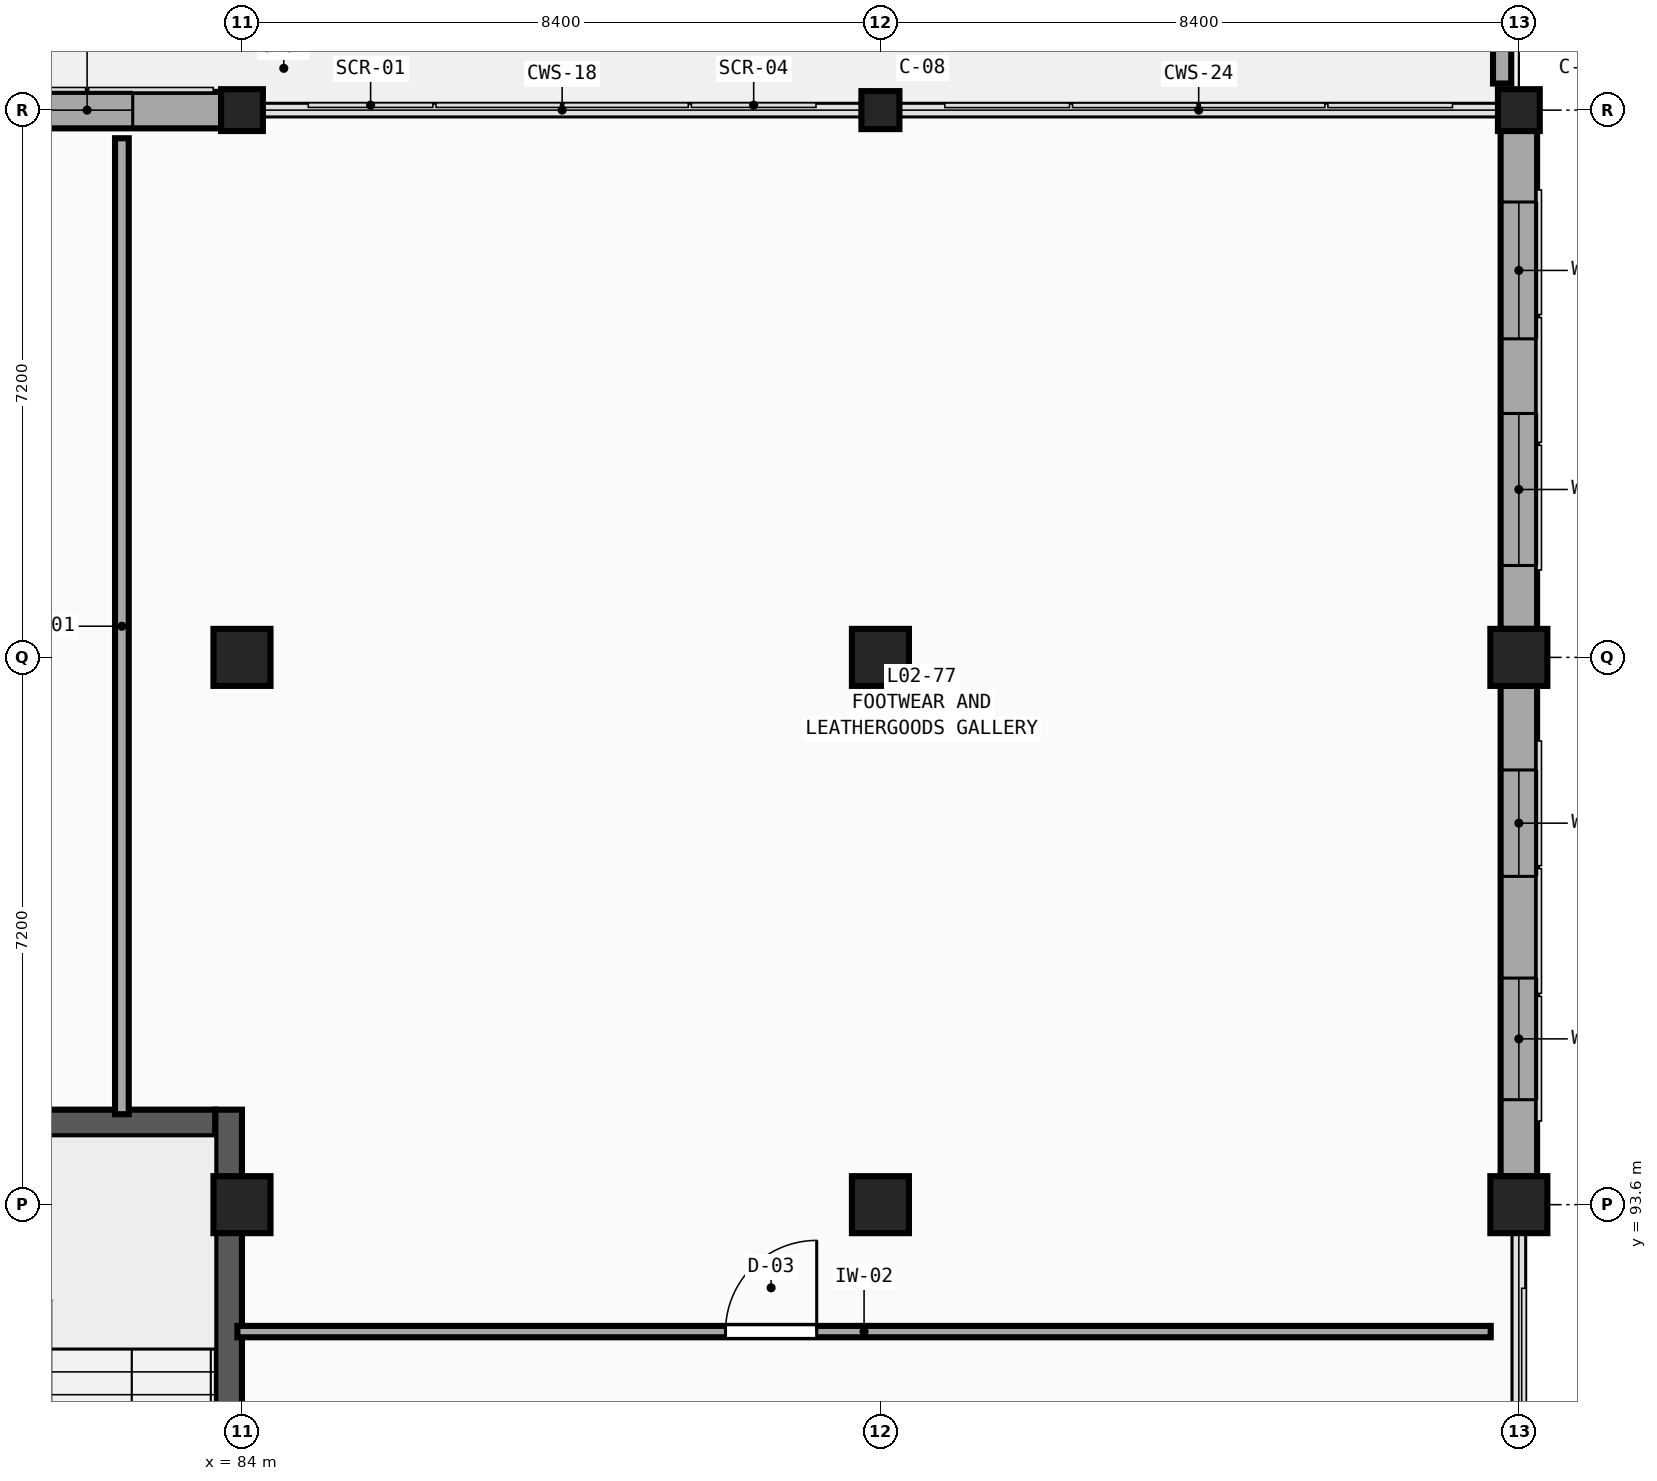
"""IFC4 building model, lengths in metres.
Left out: names, types, materials, properties, quantities, classifications, styles, units other than length and angle.
Written with IfcOpenShell. Run it as: python <this file> out.ifc"""

import sys

from ifc_helpers import new_model, si_unit, direction, frame, frame_2d, origin, origin_2d, place, context, subcontext, project, spatial, rectangle, extrude, element, fill, save


model = new_model("IFC4")
c1 = context("Model", 3, precision=1e-05, world=origin(), true_north=direction((0.0, 1.0)))
c2 = subcontext(c1, "Body", "Model", "MODEL_VIEW")
j1 = project(units=[si_unit("LENGTHUNIT", "METRE"), si_unit("PLANEANGLEUNIT", "RADIAN")], contexts=[c1])
p1 = place(None, origin())
s1 = spatial("IfcSite", under=j1, at=p1, CompositionType="ELEMENT")
p2 = place(p1, origin())
s2 = spatial("IfcBuilding", under=s1, at=p2, CompositionType="ELEMENT")
p3 = place(p2, frame((0.0, 0.0, 9.9)))
s3 = spatial("IfcBuildingStorey", under=s2, at=p3, CompositionType="ELEMENT", Elevation=9.9)
for number, where, z_axis, x_axis in (
    (1, (84.0, 93.6, 0.0), (0.0, 0.0, 1.0), (1.0, 0.0, 0.0)),
    (2, (84.0, 100.8, 0.0), (0.0, 0.0, 1.0), (1.0, 0.0, 0.0)),
):
    element("IfcColumn", number, at=place(p3, frame(where, z_axis=z_axis, x_axis=x_axis)), inside=s3, PredefinedType="COLUMN", context=c2, shape_type="SweptSolid", body=[
        extrude(rectangle(XDim=0.75, YDim=0.75, at=origin_2d()), origin(), (0.0, 0.0, 1.0), 4.5),
    ])
p4 = place(p3, frame((84.0, 108.0, 0.0), z_axis=(0.0, 0.0, 1.0), x_axis=(1.0, 0.0, 0.0)))
e3 = element("IfcColumn", 3, at=p4, inside=s3, PredefinedType="COLUMN", context=c2, shape_type="SweptSolid", body=[
    extrude(rectangle(XDim=0.55, YDim=0.55, at=origin_2d()), origin(), (0.0, 0.0, 1.0), 4.5),
])
for number, where, z_axis, x_axis in (
    (4, (92.4, 93.6, 0.0), (0.0, 0.0, 1.0), (1.0, 0.0, 0.0)),
    (5, (92.4, 100.8, 0.0), (0.0, 0.0, 1.0), (1.0, 0.0, 0.0)),
):
    element("IfcColumn", number, at=place(p3, frame(where, z_axis=z_axis, x_axis=x_axis)), inside=s3, PredefinedType="COLUMN", context=c2, shape_type="SweptSolid", body=[
        extrude(rectangle(XDim=0.75, YDim=0.75, at=origin_2d()), origin(), (0.0, 0.0, 1.0), 4.5),
    ])
p5 = place(p3, frame((92.4, 108.0, 0.0), z_axis=(0.0, 0.0, 1.0), x_axis=(1.0, 0.0, 0.0)))
e6 = element("IfcColumn", 6, at=p5, inside=s3, PredefinedType="COLUMN", context=c2, shape_type="SweptSolid", body=[
    extrude(rectangle(XDim=0.5, YDim=0.5, at=origin_2d()), origin(), (0.0, 0.0, 1.0), 4.5),
])
for number, where, z_axis, x_axis in (
    (7, (100.8, 93.6, 0.0), (0.0, 0.0, 1.0), (1.0, 0.0, 0.0)),
    (8, (100.8, 100.8, 0.0), (0.0, 0.0, 1.0), (1.0, 0.0, 0.0)),
):
    element("IfcColumn", number, at=place(p3, frame(where, z_axis=z_axis, x_axis=x_axis)), inside=s3, PredefinedType="COLUMN", context=c2, shape_type="SweptSolid", body=[
        extrude(rectangle(XDim=0.75, YDim=0.75, at=origin_2d()), origin(), (0.0, 0.0, 1.0), 4.5),
    ])
p6 = place(p3, frame((100.8, 108.0, 0.0), z_axis=(0.0, 0.0, 1.0), x_axis=(1.0, 0.0, 0.0)))
e9 = element("IfcColumn", 9, at=p6, inside=s3, PredefinedType="COLUMN", context=c2, shape_type="SweptSolid", body=[
    extrude(rectangle(XDim=0.55, YDim=0.55, at=origin_2d()), origin(), (0.0, 0.0, 1.0), 4.5),
])
p7 = place(p3, frame((80.2, 108.0, 0.0), z_axis=(0.0, 0.0, 1.0), x_axis=(1.0, 0.0, 0.0)))
e10 = element("IfcWall", 10, at=p7, inside=s3, PredefinedType="SOLIDWALL", context=c2, shape_type="SweptSolid", body=[
    extrude(rectangle(XDim=3.525, YDim=0.48, at=frame_2d((1.763, 0.0))), origin(), (0.0, 0.0, 1.0), 3.63),
])
p8 = place(p7, frame((1.163, 0.0, 0.75)))
e11 = element("IfcOpeningElement", 11, at=p8, cuts=e10, PredefinedType="OPENING", context=c2, shape_type="SweptSolid", body=[
    extrude(rectangle(XDim=1.2, YDim=2.44, at=frame_2d((0.6, 1.22))), frame((0.0, 0.26, 0.0), z_axis=(0.0, -1.0, 0.0), x_axis=(1.0, 0.0, 0.0)), (0.0, 0.0, 1.0), 0.52),
])
p9 = place(p3, frame((100.8, 100.425, 0.0), z_axis=(0.0, 0.0, 1.0), x_axis=(0.0, -1.0, 0.0)))
e12 = element("IfcWall", 12, at=p9, inside=s3, PredefinedType="SOLIDWALL", context=c2, shape_type="SweptSolid", body=[
    extrude(rectangle(XDim=6.45, YDim=0.48, at=frame_2d((3.225, 0.0))), origin(), (0.0, 0.0, 1.0), 3.63),
])
p10 = place(p9, frame((1.106, 0.0, 0.75)))
e13 = element("IfcOpeningElement", 13, at=p10, cuts=e12, PredefinedType="OPENING", context=c2, shape_type="SweptSolid", body=[
    extrude(rectangle(XDim=1.4, YDim=2.73, at=frame_2d((0.7, 1.365))), frame((0.0, 0.26, 0.0), z_axis=(0.0, -1.0, 0.0), x_axis=(1.0, 0.0, 0.0)), (0.0, 0.0, 1.0), 0.52),
])
p11 = place(p9, frame((3.844, 0.0, 0.75)))
e14 = element("IfcOpeningElement", 14, at=p11, cuts=e12, PredefinedType="OPENING", context=c2, shape_type="SweptSolid", body=[
    extrude(rectangle(XDim=1.6, YDim=2.73, at=frame_2d((0.8, 1.365))), frame((0.0, 0.26, 0.0), z_axis=(0.0, -1.0, 0.0), x_axis=(1.0, 0.0, 0.0)), (0.0, 0.0, 1.0), 0.52),
])
p12 = place(p3, frame((100.8, 107.725, 0.0), z_axis=(0.0, 0.0, 1.0), x_axis=(0.0, -1.0, 0.0)))
e15 = element("IfcWall", 15, at=p12, inside=s3, PredefinedType="SOLIDWALL", context=c2, shape_type="SweptSolid", body=[
    extrude(rectangle(XDim=6.55, YDim=0.48, at=frame_2d((3.275, 0.0))), origin(), (0.0, 0.0, 1.0), 3.63),
])
p13 = place(p12, frame((0.934, 0.0, 0.75)))
e16 = element("IfcOpeningElement", 16, at=p13, cuts=e15, PredefinedType="OPENING", context=c2, shape_type="SweptSolid", body=[
    extrude(rectangle(XDim=1.8, YDim=2.73, at=frame_2d((0.9, 1.365))), frame((0.0, 0.26, 0.0), z_axis=(0.0, -1.0, 0.0), x_axis=(1.0, 0.0, 0.0)), (0.0, 0.0, 1.0), 0.52),
])
p14 = place(p12, frame((3.716, 0.0, 0.75)))
e17 = element("IfcOpeningElement", 17, at=p14, cuts=e15, PredefinedType="OPENING", context=c2, shape_type="SweptSolid", body=[
    extrude(rectangle(XDim=2.0, YDim=2.73, at=frame_2d((1.0, 1.365))), frame((0.0, 0.26, 0.0), z_axis=(0.0, -1.0, 0.0), x_axis=(1.0, 0.0, 0.0)), (0.0, 0.0, 1.0), 0.52),
])
p15 = place(p3, frame((100.58, 114.85, 0.0), z_axis=(0.0, 0.0, 1.0), x_axis=(0.0, -1.0, 0.0)))
e18 = element("IfcWall", 18, at=p15, inside=s3, PredefinedType="PARAPET", context=c2, shape_type="SweptSolid", body=[
    extrude(rectangle(XDim=6.5, YDim=0.24, at=frame_2d((3.25, 0.0))), origin(), (0.0, 0.0, 1.0), 1.15),
])
p16 = place(p3, frame((75.95, 94.675, 0.0), z_axis=(0.0, 0.0, 1.0), x_axis=(1.0, 0.0, 0.0)))
e19 = element("IfcWall", 19, at=p16, inside=s3, PredefinedType="SHEAR", context=c2, shape_type="SweptSolid", body=[
    extrude(rectangle(XDim=7.7, YDim=0.35, at=frame_2d((3.85, 0.0))), origin(), (0.0, 0.0, 1.0), 4.5),
])
p17 = place(p3, frame((83.825, 86.5, 0.0), z_axis=(0.0, 0.0, 1.0), x_axis=(0.0, 1.0, 0.0)))
e20 = element("IfcWall", 20, at=p17, inside=s3, PredefinedType="SHEAR", context=c2, shape_type="SweptSolid", body=[
    extrude(rectangle(XDim=8.35, YDim=0.35, at=frame_2d((4.175, 0.0))), origin(), (0.0, 0.0, 1.0), 4.5),
])
p18 = place(p3, frame((83.94, 91.93, 0.0), z_axis=(0.0, 0.0, 1.0), x_axis=(1.0, 0.0, 0.0)))
e21 = element("IfcWall", 21, at=p18, inside=s3, PredefinedType="PARTITIONING", context=c2, shape_type="SweptSolid", body=[
    extrude(rectangle(XDim=16.49, YDim=0.15, at=frame_2d((8.245, 0.0))), origin(), (0.0, 0.0, 1.0), 4.18),
])
p19 = place(p18, frame((6.422, 0.0, 0.0)))
e22 = element("IfcOpeningElement", 22, at=p19, cuts=e21, PredefinedType="OPENING", context=c2, shape_type="SweptSolid", body=[
    extrude(rectangle(XDim=1.2, YDim=2.05, at=frame_2d((0.6, 1.025))), frame((0.0, 0.095, 0.0), z_axis=(0.0, -1.0, 0.0), x_axis=(1.0, 0.0, 0.0)), (0.0, 0.0, 1.0), 0.19),
])
p20 = place(p3, frame((82.42, 94.79, 0.0), z_axis=(0.0, 0.0, 1.0), x_axis=(0.0, 1.0, 0.0)))
e23 = element("IfcWall", 23, at=p20, inside=s3, PredefinedType="PARTITIONING", context=c2, shape_type="SweptSolid", body=[
    extrude(rectangle(XDim=12.84, YDim=0.18, at=frame_2d((6.42, 0.0))), origin(), (0.0, 0.0, 1.0), 4.18),
])
p21 = place(p8, origin())
e24 = element("IfcWindow", 24, at=p21, inside=s3, PartitioningType="SINGLE_PANEL", PredefinedType="WINDOW", context=c2, shape_type="SweptSolid", body=[
    extrude(rectangle(XDim=1.2, YDim=2.44, at=frame_2d((0.6, 1.22))), frame((0.0, 0.03, 0.0), z_axis=(0.0, -1.0, 0.0), x_axis=(1.0, 0.0, 0.0)), (0.0, 0.0, 1.0), 0.06),
])
fill(e11, e24)
p22 = place(p10, origin())
e25 = element("IfcWindow", 25, at=p22, inside=s3, PartitioningType="DOUBLE_PANEL_VERTICAL", PredefinedType="WINDOW", context=c2, shape_type="SweptSolid", body=[
    extrude(rectangle(XDim=1.4, YDim=2.73, at=frame_2d((0.7, 1.365))), frame((0.0, 0.03, 0.0), z_axis=(0.0, -1.0, 0.0), x_axis=(1.0, 0.0, 0.0)), (0.0, 0.0, 1.0), 0.06),
])
fill(e13, e25)
p23 = place(p11, origin())
e26 = element("IfcWindow", 26, at=p23, inside=s3, PartitioningType="DOUBLE_PANEL_VERTICAL", PredefinedType="WINDOW", context=c2, shape_type="SweptSolid", body=[
    extrude(rectangle(XDim=1.6, YDim=2.73, at=frame_2d((0.8, 1.365))), frame((0.0, 0.03, 0.0), z_axis=(0.0, -1.0, 0.0), x_axis=(1.0, 0.0, 0.0)), (0.0, 0.0, 1.0), 0.06),
])
fill(e14, e26)
p24 = place(p13, origin())
e27 = element("IfcWindow", 27, at=p24, inside=s3, PartitioningType="DOUBLE_PANEL_VERTICAL", PredefinedType="WINDOW", context=c2, shape_type="SweptSolid", body=[
    extrude(rectangle(XDim=1.8, YDim=2.73, at=frame_2d((0.9, 1.365))), frame((0.0, 0.03, 0.0), z_axis=(0.0, -1.0, 0.0), x_axis=(1.0, 0.0, 0.0)), (0.0, 0.0, 1.0), 0.06),
])
fill(e16, e27)
p25 = place(p14, origin())
e28 = element("IfcWindow", 28, at=p25, inside=s3, PartitioningType="TRIPLE_PANEL_VERTICAL", PredefinedType="WINDOW", context=c2, shape_type="SweptSolid", body=[
    extrude(rectangle(XDim=2.0, YDim=2.73, at=frame_2d((1.0, 1.365))), frame((0.0, 0.03, 0.0), z_axis=(0.0, -1.0, 0.0), x_axis=(1.0, 0.0, 0.0)), (0.0, 0.0, 1.0), 0.06),
])
fill(e17, e28)
p26 = place(p19, origin())
e29 = element("IfcDoor", 29, at=p26, inside=s3, OperationType="SINGLE_SWING_RIGHT", PredefinedType="DOOR", context=c2, shape_type="SweptSolid", body=[
    extrude(rectangle(XDim=1.2, YDim=2.05, at=frame_2d((0.6, 1.025))), frame((0.0, 0.025, 0.0), z_axis=(0.0, -1.0, 0.0), x_axis=(1.0, 0.0, 0.0)), (0.0, 0.0, 1.0), 0.05),
])
fill(e22, e29)
save(model, sys.argv[1])
